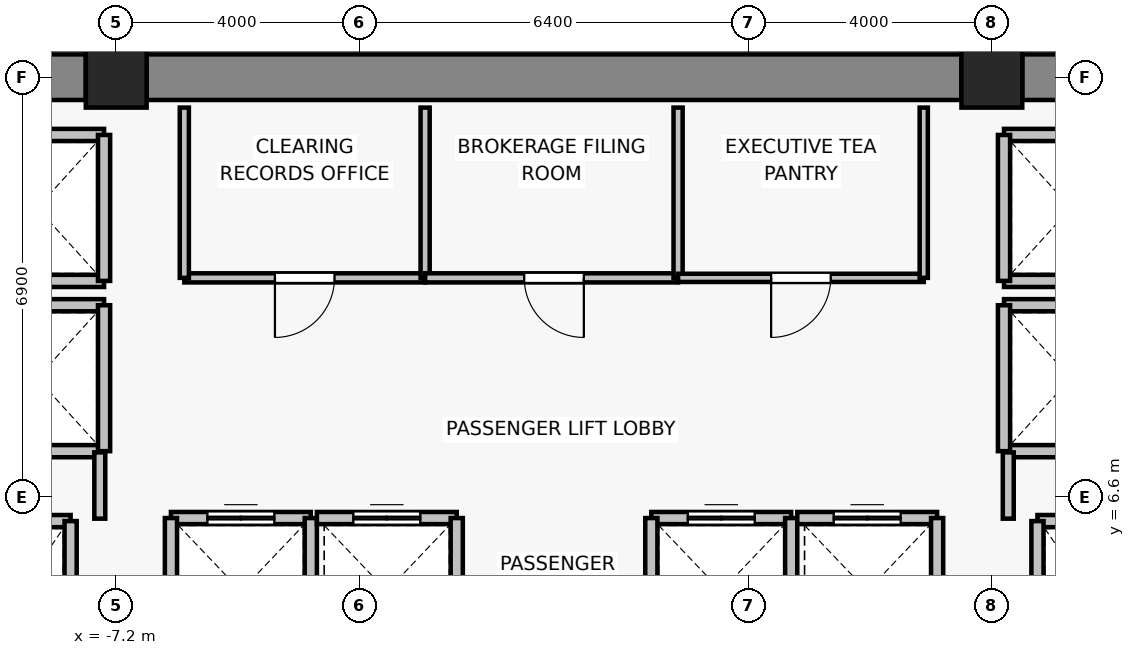
"""IFC4 building model, lengths in metres.
Left out: names, types, materials, properties, quantities, classifications, styles, units other than length and angle.
Written with IfcOpenShell. Run it as: python <this file> out.ifc"""

import sys

from ifc_helpers import new_model, si_unit, direction, frame, frame_2d, origin, origin_2d, place, context, subcontext, project, spatial, rectangle, extrude, source, transform, mapped, element, fill, save


model = new_model("IFC4")
c1 = context("Model", 3, precision=1e-05, world=origin(), true_north=direction((0.0, 1.0)))
c2 = subcontext(c1, "Body", "Model", "MODEL_VIEW")
j1 = project(units=[si_unit("LENGTHUNIT", "METRE"), si_unit("PLANEANGLEUNIT", "RADIAN")], contexts=[c1])
p1 = place(None, origin())
s1 = spatial("IfcSite", under=j1, at=p1, CompositionType="ELEMENT")
p2 = place(p1, origin())
s2 = spatial("IfcBuilding", under=s1, at=p2, CompositionType="ELEMENT")
p3 = place(p2, frame((0.0, 0.0, 136.3)))
s3 = spatial("IfcBuildingStorey", under=s2, at=p3, CompositionType="ELEMENT", Elevation=136.3)
for number, where, z_axis, x_axis in (
    (1, (-7.2, 13.5, 0.0), (0.0, 0.0, 1.0), (1.0, 0.0, 0.0)),
    (2, (7.2, 13.5, 0.0), (0.0, 0.0, 1.0), (1.0, 0.0, 0.0)),
):
    element("IfcColumn", number, at=place(p3, frame(where, z_axis=z_axis, x_axis=x_axis)), inside=s3, PredefinedType="COLUMN", context=c2, shape_type="SweptSolid", body=[
        extrude(rectangle(XDim=1.0, YDim=1.0, at=origin_2d()), origin(), (0.0, 0.0, 1.0), 3.3),
    ])
p4 = place(p3, frame((-13.9, 13.5, 0.0), z_axis=(0.0, 0.0, 1.0), x_axis=(1.0, 0.0, 0.0)))
e3 = element("IfcWall", 3, at=p4, inside=s3, PredefinedType="SHEAR", context=c2, shape_type="SweptSolid", body=[
    extrude(rectangle(XDim=6.2, YDim=0.75, at=frame_2d((3.1, 0.0))), origin(), (0.0, 0.0, 1.0), 3.05),
])
p5 = place(p3, frame((-6.7, 13.5, 0.0), z_axis=(0.0, 0.0, 1.0), x_axis=(1.0, 0.0, 0.0)))
e4 = element("IfcWall", 4, at=p5, inside=s3, PredefinedType="SHEAR", context=c2, shape_type="SweptSolid", body=[
    extrude(rectangle(XDim=13.4, YDim=0.75, at=frame_2d((6.7, 0.0))), origin(), (0.0, 0.0, 1.0), 3.05),
])
p6 = place(p3, frame((7.7, 13.5, 0.0), z_axis=(0.0, 0.0, 1.0), x_axis=(1.0, 0.0, 0.0)))
e5 = element("IfcWall", 5, at=p6, inside=s3, PredefinedType="SHEAR", context=c2, shape_type="SweptSolid", body=[
    extrude(rectangle(XDim=6.2, YDim=0.75, at=frame_2d((3.1, 0.0))), origin(), (0.0, 0.0, 1.0), 3.05),
])
p7 = place(p3, frame((-9.95, 6.2, 0.0), z_axis=(0.0, 0.0, 1.0), x_axis=(1.0, 0.0, 0.0)))
e6 = element("IfcWall", 6, at=p7, inside=s3, PredefinedType="SOLIDWALL", context=c2, shape_type="SweptSolid", body=[
    extrude(rectangle(XDim=2.0, YDim=0.2, at=frame_2d((1.0, 0.0))), origin(), (0.0, 0.0, 1.0), 3.05),
])
p8 = place(p3, frame((-7.95, 6.2, 0.0), z_axis=(0.0, 0.0, 1.0), x_axis=(0.0, -1.0, 0.0)))
e7 = element("IfcWall", 7, at=p8, inside=s3, PredefinedType="SOLIDWALL", context=c2, shape_type="SweptSolid", body=[
    extrude(rectangle(XDim=2.8, YDim=0.2, at=frame_2d((1.4, 0.0))), origin(), (0.0, 0.0, 1.0), 3.05),
])
p9 = place(p3, frame((7.95, 6.2, 0.0), z_axis=(0.0, 0.0, 1.0), x_axis=(1.0, 0.0, 0.0)))
e8 = element("IfcWall", 8, at=p9, inside=s3, PredefinedType="SOLIDWALL", context=c2, shape_type="SweptSolid", body=[
    extrude(rectangle(XDim=2.0, YDim=0.2, at=frame_2d((1.0, 0.0))), origin(), (0.0, 0.0, 1.0), 3.05),
])
p10 = place(p3, frame((7.95, 3.4, 0.0), z_axis=(0.0, 0.0, 1.0), x_axis=(0.0, 1.0, 0.0)))
e9 = element("IfcWall", 9, at=p10, inside=s3, PredefinedType="SOLIDWALL", context=c2, shape_type="SweptSolid", body=[
    extrude(rectangle(XDim=2.8, YDim=0.2, at=frame_2d((1.4, 0.0))), origin(), (0.0, 0.0, 1.0), 3.05),
])
p11 = place(p3, frame((-6.3, 6.25, 0.0), z_axis=(0.0, 0.0, 1.0), x_axis=(1.0, 0.0, 0.0)))
e10 = element("IfcWall", 10, at=p11, inside=s3, PredefinedType="SOLIDWALL", context=c2, shape_type="SweptSolid", body=[
    extrude(rectangle(XDim=2.3, YDim=0.2, at=frame_2d((1.15, 0.0))), origin(), (0.0, 0.0, 1.0), 3.05),
])
p12 = place(p11, frame((0.6, 0.0, 0.0)))
e11 = element("IfcOpeningElement", 11, at=p12, cuts=e10, PredefinedType="OPENING", context=c2, shape_type="SweptSolid", body=[
    extrude(rectangle(XDim=1.1, YDim=2.2, at=frame_2d((0.55, 1.1))), frame((0.0, 0.11, 0.0), z_axis=(0.0, -1.0, 0.0), x_axis=(1.0, 0.0, 0.0)), (0.0, 0.0, 1.0), 0.22),
])
for number, where, z_axis, x_axis in (
    (12, (-6.3, 3.85, 0.0), (0.0, 0.0, 1.0), (0.0, 1.0, 0.0)),
    (13, (-4.0, 6.25, 0.0), (0.0, 0.0, 1.0), (0.0, -1.0, 0.0)),
):
    element("IfcWall", number, at=place(p3, frame(where, z_axis=z_axis, x_axis=x_axis)), inside=s3, PredefinedType="SOLIDWALL", context=c2, shape_type="SweptSolid", body=[
        extrude(rectangle(XDim=2.4, YDim=0.2, at=frame_2d((1.2, 0.0))), origin(), (0.0, 0.0, 1.0), 3.05),
    ])
p13 = place(p3, frame((-3.9, 6.25, 0.0), z_axis=(0.0, 0.0, 1.0), x_axis=(1.0, 0.0, 0.0)))
e14 = element("IfcWall", 14, at=p13, inside=s3, PredefinedType="SOLIDWALL", context=c2, shape_type="SweptSolid", body=[
    extrude(rectangle(XDim=2.3, YDim=0.2, at=frame_2d((1.15, 0.0))), origin(), (0.0, 0.0, 1.0), 3.05),
])
p14 = place(p13, frame((0.6, 0.0, 0.0)))
e15 = element("IfcOpeningElement", 15, at=p14, cuts=e14, PredefinedType="OPENING", context=c2, shape_type="SweptSolid", body=[
    extrude(rectangle(XDim=1.1, YDim=2.2, at=frame_2d((0.55, 1.1))), frame((0.0, 0.11, 0.0), z_axis=(0.0, -1.0, 0.0), x_axis=(1.0, 0.0, 0.0)), (0.0, 0.0, 1.0), 0.22),
])
p15 = place(p3, frame((-1.6, 6.25, 0.0), z_axis=(0.0, 0.0, 1.0), x_axis=(0.0, -1.0, 0.0)))
e16 = element("IfcWall", 16, at=p15, inside=s3, PredefinedType="SOLIDWALL", context=c2, shape_type="SweptSolid", body=[
    extrude(rectangle(XDim=2.4, YDim=0.2, at=frame_2d((1.2, 0.0))), origin(), (0.0, 0.0, 1.0), 3.05),
])
p16 = place(p3, frame((1.6, 6.25, 0.0), z_axis=(0.0, 0.0, 1.0), x_axis=(1.0, 0.0, 0.0)))
e17 = element("IfcWall", 17, at=p16, inside=s3, PredefinedType="SOLIDWALL", context=c2, shape_type="SweptSolid", body=[
    extrude(rectangle(XDim=2.3, YDim=0.2, at=frame_2d((1.15, 0.0))), origin(), (0.0, 0.0, 1.0), 3.05),
])
p17 = place(p16, frame((0.6, 0.0, 0.0)))
e18 = element("IfcOpeningElement", 18, at=p17, cuts=e17, PredefinedType="OPENING", context=c2, shape_type="SweptSolid", body=[
    extrude(rectangle(XDim=1.1, YDim=2.2, at=frame_2d((0.55, 1.1))), frame((0.0, 0.11, 0.0), z_axis=(0.0, -1.0, 0.0), x_axis=(1.0, 0.0, 0.0)), (0.0, 0.0, 1.0), 0.22),
])
for number, where, z_axis, x_axis in (
    (19, (1.6, 3.85, 0.0), (0.0, 0.0, 1.0), (0.0, 1.0, 0.0)),
    (20, (3.9, 6.25, 0.0), (0.0, 0.0, 1.0), (0.0, -1.0, 0.0)),
):
    element("IfcWall", number, at=place(p3, frame(where, z_axis=z_axis, x_axis=x_axis)), inside=s3, PredefinedType="SOLIDWALL", context=c2, shape_type="SweptSolid", body=[
        extrude(rectangle(XDim=2.4, YDim=0.2, at=frame_2d((1.2, 0.0))), origin(), (0.0, 0.0, 1.0), 3.05),
    ])
p18 = place(p3, frame((4.0, 6.25, 0.0), z_axis=(0.0, 0.0, 1.0), x_axis=(1.0, 0.0, 0.0)))
e21 = element("IfcWall", 21, at=p18, inside=s3, PredefinedType="SOLIDWALL", context=c2, shape_type="SweptSolid", body=[
    extrude(rectangle(XDim=2.3, YDim=0.2, at=frame_2d((1.15, 0.0))), origin(), (0.0, 0.0, 1.0), 3.05),
])
p19 = place(p18, frame((0.6, 0.0, 0.0)))
e22 = element("IfcOpeningElement", 22, at=p19, cuts=e21, PredefinedType="OPENING", context=c2, shape_type="SweptSolid", body=[
    extrude(rectangle(XDim=1.1, YDim=2.2, at=frame_2d((0.55, 1.1))), frame((0.0, 0.11, 0.0), z_axis=(0.0, -1.0, 0.0), x_axis=(1.0, 0.0, 0.0)), (0.0, 0.0, 1.0), 0.22),
])
p20 = place(p3, frame((6.3, 6.25, 0.0), z_axis=(0.0, 0.0, 1.0), x_axis=(0.0, -1.0, 0.0)))
e23 = element("IfcWall", 23, at=p20, inside=s3, PredefinedType="SOLIDWALL", context=c2, shape_type="SweptSolid", body=[
    extrude(rectangle(XDim=2.4, YDim=0.2, at=frame_2d((1.2, 0.0))), origin(), (0.0, 0.0, 1.0), 3.05),
])
for number, where, z_axis, x_axis in (
    (24, (-7.4, 7.35, 0.0), (0.0, 0.0, 1.0), (-1.0, 0.0, 0.0)),
    (25, (-9.6, 9.75, 0.0), (0.0, 0.0, 1.0), (1.0, 0.0, 0.0)),
):
    element("IfcWall", number, at=place(p3, frame(where, z_axis=z_axis, x_axis=x_axis)), inside=s3, PredefinedType="SOLIDWALL", context=c2, shape_type="SweptSolid", body=[
        extrude(rectangle(XDim=2.2, YDim=0.2, at=frame_2d((1.1, 0.0))), origin(), (0.0, 0.0, 1.0), 2.49),
    ])
p21 = place(p3, frame((-7.4, 9.75, 0.0), z_axis=(0.0, 0.0, 1.0), x_axis=(0.0, -1.0, 0.0)))
e26 = element("IfcWall", 26, at=p21, inside=s3, PredefinedType="SOLIDWALL", context=c2, shape_type="SweptSolid", body=[
    extrude(rectangle(XDim=2.4, YDim=0.2, at=frame_2d((1.2, 0.0))), origin(), (0.0, 0.0, 1.0), 2.49),
])
for number, where, z_axis, x_axis in (
    (27, (-7.4, 10.15, 0.0), (0.0, 0.0, 1.0), (-1.0, 0.0, 0.0)),
    (28, (-9.6, 12.55, 0.0), (0.0, 0.0, 1.0), (1.0, 0.0, 0.0)),
):
    element("IfcWall", number, at=place(p3, frame(where, z_axis=z_axis, x_axis=x_axis)), inside=s3, PredefinedType="SOLIDWALL", context=c2, shape_type="SweptSolid", body=[
        extrude(rectangle(XDim=2.2, YDim=0.2, at=frame_2d((1.1, 0.0))), origin(), (0.0, 0.0, 1.0), 2.49),
    ])
p22 = place(p3, frame((-7.4, 12.55, 0.0), z_axis=(0.0, 0.0, 1.0), x_axis=(0.0, -1.0, 0.0)))
e29 = element("IfcWall", 29, at=p22, inside=s3, PredefinedType="SOLIDWALL", context=c2, shape_type="SweptSolid", body=[
    extrude(rectangle(XDim=2.4, YDim=0.2, at=frame_2d((1.2, 0.0))), origin(), (0.0, 0.0, 1.0), 2.49),
])
for number, where, z_axis, x_axis in (
    (30, (9.6, 7.35, 0.0), (0.0, 0.0, 1.0), (-1.0, 0.0, 0.0)),
    (31, (7.4, 9.75, 0.0), (0.0, 0.0, 1.0), (1.0, 0.0, 0.0)),
):
    element("IfcWall", number, at=place(p3, frame(where, z_axis=z_axis, x_axis=x_axis)), inside=s3, PredefinedType="SOLIDWALL", context=c2, shape_type="SweptSolid", body=[
        extrude(rectangle(XDim=2.2, YDim=0.2, at=frame_2d((1.1, 0.0))), origin(), (0.0, 0.0, 1.0), 2.49),
    ])
p23 = place(p3, frame((7.4, 7.35, 0.0), z_axis=(0.0, 0.0, 1.0), x_axis=(0.0, 1.0, 0.0)))
e32 = element("IfcWall", 32, at=p23, inside=s3, PredefinedType="SOLIDWALL", context=c2, shape_type="SweptSolid", body=[
    extrude(rectangle(XDim=2.4, YDim=0.2, at=frame_2d((1.2, 0.0))), origin(), (0.0, 0.0, 1.0), 2.49),
])
for number, where, z_axis, x_axis in (
    (33, (9.6, 10.15, 0.0), (0.0, 0.0, 1.0), (-1.0, 0.0, 0.0)),
    (34, (7.4, 12.55, 0.0), (0.0, 0.0, 1.0), (1.0, 0.0, 0.0)),
):
    element("IfcWall", number, at=place(p3, frame(where, z_axis=z_axis, x_axis=x_axis)), inside=s3, PredefinedType="SOLIDWALL", context=c2, shape_type="SweptSolid", body=[
        extrude(rectangle(XDim=2.2, YDim=0.2, at=frame_2d((1.1, 0.0))), origin(), (0.0, 0.0, 1.0), 2.49),
    ])
p24 = place(p3, frame((7.4, 10.15, 0.0), z_axis=(0.0, 0.0, 1.0), x_axis=(0.0, 1.0, 0.0)))
e35 = element("IfcWall", 35, at=p24, inside=s3, PredefinedType="SOLIDWALL", context=c2, shape_type="SweptSolid", body=[
    extrude(rectangle(XDim=2.4, YDim=0.2, at=frame_2d((1.2, 0.0))), origin(), (0.0, 0.0, 1.0), 2.49),
])
for number, where, z_axis, x_axis in (
    (36, (-7.47, 7.33, 0.0), (0.0, 0.0, 1.0), (0.0, -1.0, 0.0)),
    (37, (7.47, 6.24, 0.0), (0.0, 0.0, 1.0), (0.0, 1.0, 0.0)),
):
    element("IfcWall", number, at=place(p3, frame(where, z_axis=z_axis, x_axis=x_axis)), inside=s3, PredefinedType="PARTITIONING", context=c2, shape_type="SweptSolid", body=[
        extrude(rectangle(XDim=1.09, YDim=0.18, at=frame_2d((0.545, 0.0))), origin(), (0.0, 0.0, 1.0), 2.49),
    ])
p25 = place(p3, frame((-2.12, 10.2, 0.0), z_axis=(0.0, 0.0, 1.0), x_axis=(-1.0, 0.0, 0.0)))
e38 = element("IfcWall", 38, at=p25, inside=s3, PredefinedType="PARTITIONING", context=c2, shape_type="SweptSolid", body=[
    extrude(rectangle(XDim=3.96, YDim=0.15, at=frame_2d((1.98, 0.0))), origin(), (0.0, 0.0, 1.0), 3.05),
])
p26 = place(p25, frame((1.49, 0.0, 0.0)))
e39 = element("IfcOpeningElement", 39, at=p26, cuts=e38, PredefinedType="OPENING", context=c2, shape_type="SweptSolid", body=[
    extrude(rectangle(XDim=0.98, YDim=2.15, at=frame_2d((0.49, 1.075))), frame((0.0, 0.085, 0.0), z_axis=(0.0, -1.0, 0.0), x_axis=(1.0, 0.0, 0.0)), (0.0, 0.0, 1.0), 0.17),
])
for number, where, z_axis, x_axis in (
    (40, (-6.08, 10.2, 0.0), (0.0, 0.0, 1.0), (0.0, 1.0, 0.0)),
    (41, (-2.12, 13.0, 0.0), (0.0, 0.0, 1.0), (0.0, -1.0, 0.0)),
):
    element("IfcWall", number, at=place(p3, frame(where, z_axis=z_axis, x_axis=x_axis)), inside=s3, PredefinedType="PARTITIONING", context=c2, shape_type="SweptSolid", body=[
        extrude(rectangle(XDim=2.8, YDim=0.15, at=frame_2d((1.4, 0.0))), origin(), (0.0, 0.0, 1.0), 3.05),
    ])
p27 = place(p3, frame((2.04, 10.2, 0.0), z_axis=(0.0, 0.0, 1.0), x_axis=(-1.0, 0.0, 0.0)))
e42 = element("IfcWall", 42, at=p27, inside=s3, PredefinedType="PARTITIONING", context=c2, shape_type="SweptSolid", body=[
    extrude(rectangle(XDim=4.16, YDim=0.15, at=frame_2d((2.08, 0.0))), origin(), (0.0, 0.0, 1.0), 3.05),
])
p28 = place(p27, frame((1.55, 0.0, 0.0)))
e43 = element("IfcOpeningElement", 43, at=p28, cuts=e42, PredefinedType="OPENING", context=c2, shape_type="SweptSolid", body=[
    extrude(rectangle(XDim=0.98, YDim=2.15, at=frame_2d((0.49, 1.075))), frame((0.0, 0.085, 0.0), z_axis=(0.0, -1.0, 0.0), x_axis=(1.0, 0.0, 0.0)), (0.0, 0.0, 1.0), 0.17),
])
p29 = place(p3, frame((2.04, 13.0, 0.0), z_axis=(0.0, 0.0, 1.0), x_axis=(0.0, -1.0, 0.0)))
e44 = element("IfcWall", 44, at=p29, inside=s3, PredefinedType="PARTITIONING", context=c2, shape_type="SweptSolid", body=[
    extrude(rectangle(XDim=2.8, YDim=0.15, at=frame_2d((1.4, 0.0))), origin(), (0.0, 0.0, 1.0), 3.05),
])
p30 = place(p3, frame((6.08, 10.2, 0.0), z_axis=(0.0, 0.0, 1.0), x_axis=(-1.0, 0.0, 0.0)))
e45 = element("IfcWall", 45, at=p30, inside=s3, PredefinedType="PARTITIONING", context=c2, shape_type="SweptSolid", body=[
    extrude(rectangle(XDim=4.04, YDim=0.135, at=frame_2d((2.02, 0.0))), origin(), (0.0, 0.0, 1.0), 3.05),
])
p31 = place(p30, frame((1.53, 0.0, 0.0)))
e46 = element("IfcOpeningElement", 46, at=p31, cuts=e45, PredefinedType="OPENING", context=c2, shape_type="SweptSolid", body=[
    extrude(rectangle(XDim=0.98, YDim=2.15, at=frame_2d((0.49, 1.075))), frame((0.0, 0.077, 0.0), z_axis=(0.0, -1.0, 0.0), x_axis=(1.0, 0.0, 0.0)), (0.0, 0.0, 1.0), 0.155),
])
p32 = place(p3, frame((6.08, 13.0, 0.0), z_axis=(0.0, 0.0, 1.0), x_axis=(0.0, -1.0, 0.0)))
e47 = element("IfcWall", 47, at=p32, inside=s3, PredefinedType="PARTITIONING", context=c2, shape_type="SweptSolid", body=[
    extrude(rectangle(XDim=2.8, YDim=0.135, at=frame_2d((1.4, 0.0))), origin(), (0.0, 0.0, 1.0), 3.05),
])
m1 = source(origin(), c2, "Body", "SweptSolid", [
    extrude(rectangle(XDim=1.1, YDim=2.2, at=frame_2d((0.55, 1.1))), frame((0.0, 0.025, 0.0), z_axis=(0.0, -1.0, 0.0), x_axis=(1.0, 0.0, 0.0)), (0.0, 0.0, 1.0), 0.05),
])
p33 = place(p12, origin())
e48 = element("IfcDoor", 48, at=p33, inside=s3, OperationType="DOUBLE_DOOR_SLIDING", PredefinedType="DOOR", context=c2, shape_type="MappedRepresentation", body=[
    mapped(m1, transform((0.0, 0.0, 0.0), x_axis=(1.0, 0.0, 0.0), y_axis=(0.0, 1.0, 0.0), z_axis=(0.0, 0.0, 1.0), scale=1.0)),
])
fill(e11, e48)
p34 = place(p14, origin())
e49 = element("IfcDoor", 49, at=p34, inside=s3, OperationType="DOUBLE_DOOR_SLIDING", PredefinedType="DOOR", context=c2, shape_type="MappedRepresentation", body=[
    mapped(m1, transform((0.0, 0.0, 0.0), x_axis=(1.0, 0.0, 0.0), y_axis=(0.0, 1.0, 0.0), z_axis=(0.0, 0.0, 1.0), scale=1.0)),
])
fill(e15, e49)
p35 = place(p17, origin())
e50 = element("IfcDoor", 50, at=p35, inside=s3, OperationType="DOUBLE_DOOR_SLIDING", PredefinedType="DOOR", context=c2, shape_type="MappedRepresentation", body=[
    mapped(m1, transform((0.0, 0.0, 0.0), x_axis=(1.0, 0.0, 0.0), y_axis=(0.0, 1.0, 0.0), z_axis=(0.0, 0.0, 1.0), scale=1.0)),
])
fill(e18, e50)
p36 = place(p19, origin())
e51 = element("IfcDoor", 51, at=p36, inside=s3, OperationType="DOUBLE_DOOR_SLIDING", PredefinedType="DOOR", context=c2, shape_type="MappedRepresentation", body=[
    mapped(m1, transform((0.0, 0.0, 0.0), x_axis=(1.0, 0.0, 0.0), y_axis=(0.0, 1.0, 0.0), z_axis=(0.0, 0.0, 1.0), scale=1.0)),
])
fill(e22, e51)
m2 = source(origin(), c2, "Body", "SweptSolid", [
    extrude(rectangle(XDim=0.98, YDim=2.15, at=frame_2d((0.49, 1.075))), frame((0.0, 0.025, 0.0), z_axis=(0.0, -1.0, 0.0), x_axis=(1.0, 0.0, 0.0)), (0.0, 0.0, 1.0), 0.05),
])
p37 = place(p26, origin())
e52 = element("IfcDoor", 52, at=p37, inside=s3, OperationType="SINGLE_SWING_RIGHT", PredefinedType="DOOR", context=c2, shape_type="MappedRepresentation", body=[
    mapped(m2, transform((0.0, 0.0, 0.0), x_axis=(1.0, 0.0, 0.0), y_axis=(0.0, 1.0, 0.0), z_axis=(0.0, 0.0, 1.0), scale=1.0)),
])
fill(e39, e52)
p38 = place(p28, origin())
e53 = element("IfcDoor", 53, at=p38, inside=s3, OperationType="SINGLE_SWING_LEFT", PredefinedType="DOOR", context=c2, shape_type="MappedRepresentation", body=[
    mapped(m2, transform((0.0, 0.0, 0.0), x_axis=(1.0, 0.0, 0.0), y_axis=(0.0, 1.0, 0.0), z_axis=(0.0, 0.0, 1.0), scale=1.0)),
])
fill(e43, e53)
p39 = place(p31, origin())
e54 = element("IfcDoor", 54, at=p39, inside=s3, OperationType="SINGLE_SWING_RIGHT", PredefinedType="DOOR", context=c2, shape_type="MappedRepresentation", body=[
    mapped(m2, transform((0.0, 0.0, 0.0), x_axis=(1.0, 0.0, 0.0), y_axis=(0.0, 1.0, 0.0), z_axis=(0.0, 0.0, 1.0), scale=1.0)),
])
fill(e46, e54)
save(model, sys.argv[1])
